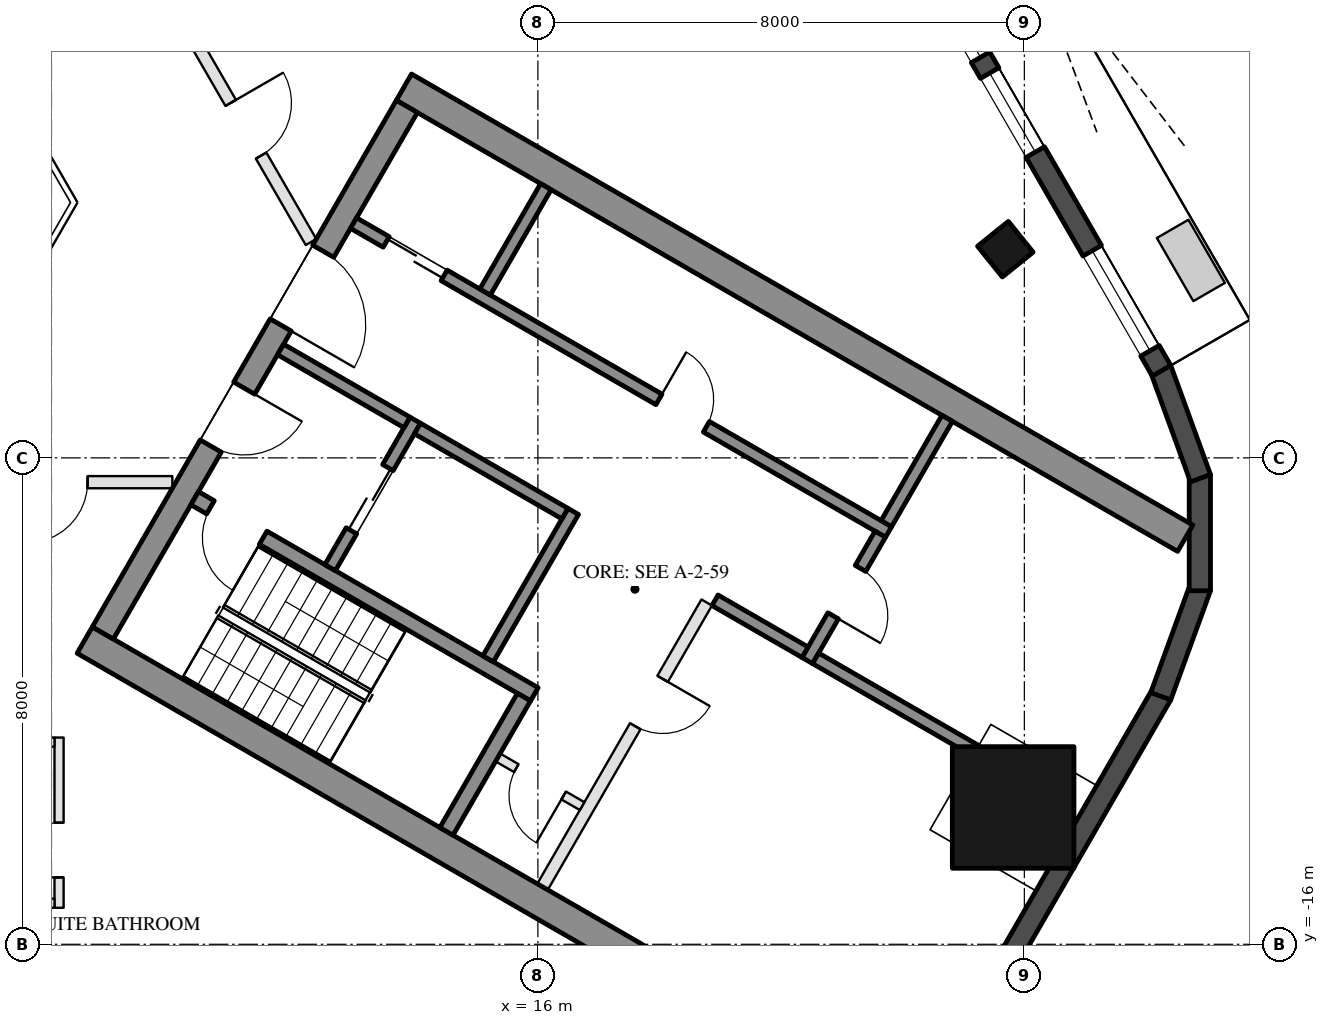
"""IFC4 building model, lengths in metres.
Left out: names, types, materials, properties, quantities, classifications, styles, units other than length and angle.
Written with IfcOpenShell. Run it as: python <this file> out.ifc"""

import sys

from ifc_helpers import new_model, si_unit, direction, frame, frame_2d, origin, origin_2d, place, context, subcontext, project, spatial, rectangle, hollow_rectangle, extrude, boolean, halfspace, element, fill, save


model = new_model("IFC4")
c1 = context("Model", 3, precision=1e-05, world=origin(), true_north=direction((0.0, 1.0)))
c2 = subcontext(c1, "Body", "Model", "MODEL_VIEW")
j1 = project(units=[si_unit("LENGTHUNIT", "METRE"), si_unit("PLANEANGLEUNIT", "RADIAN")], contexts=[c1])
p1 = place(None, origin())
s1 = spatial("IfcSite", under=j1, at=p1, CompositionType="ELEMENT")
p2 = place(p1, origin())
s2 = spatial("IfcBuilding", under=s1, at=p2, CompositionType="ELEMENT")
p3 = place(p2, frame((0.0, 0.0, 254.1)))
s3 = spatial("IfcBuildingStorey", under=s2, at=p3, CompositionType="ELEMENT", Elevation=254.1)
p4 = place(p3, frame((23.688, -4.568, 0.0), z_axis=(-0.190735837279, 0.02958801006, 0.981195388309), x_axis=(0.488489055842, -0.864137452388, 0.121016138189)))
e1 = element("IfcColumn", 1, at=p4, inside=s3, PredefinedType="COLUMN", context=c2, shape_type="SweptSolid", body=[
    boolean("DIFFERENCE", boolean("DIFFERENCE", extrude(hollow_rectangle(XDim=0.65, YDim=0.65, WallThickness=0.03, at=origin_2d()), origin(), (0.0, 0.0, 1.0), 3.771), halfspace(frame((0.0, 0.0, 0.047), z_axis=(0.0, 0.0, 1.0), x_axis=(1.0, 0.0, 0.0)), True)), halfspace(frame((0.0, 0.0, 3.724), z_axis=(0.0, 0.0, 1.0), x_axis=(1.0, 0.0, 0.0)), False)),
])
p5 = place(p3, frame((23.816, -13.75, 0.0), z_axis=(-0.188199890685, 0.108656131275, 0.976101760209), x_axis=(-0.499981359081, -0.866036165848, 3.792844e-06)))
e2 = element("IfcColumn", 2, at=p5, inside=s3, PredefinedType="COLUMN", context=c2, shape_type="SweptSolid", body=[
    boolean("DIFFERENCE", boolean("DIFFERENCE", extrude(hollow_rectangle(XDim=2.0, YDim=2.0, WallThickness=0.05, at=origin_2d()), origin(), (0.0, 0.0, 1.0), 3.791), halfspace(frame((0.0, 0.0, 0.112), z_axis=(0.0, 0.0, 1.0), x_axis=(1.0, 0.0, 0.0)), True)), halfspace(frame((0.0, 0.0, 3.678), z_axis=(0.0, 0.0, 1.0), x_axis=(1.0, 0.0, 0.0)), False)),
])
p6 = place(p3, frame((23.427, -16.792, 0.0), z_axis=(0.0, 0.0, 1.0), x_axis=(0.500018773155, 0.866014564827, 0.0)))
e3 = element("IfcWall", 3, at=p6, inside=s3, PredefinedType="SOLIDWALL", context=c2, shape_type="SweptSolid", body=[
    extrude(rectangle(XDim=5.658, YDim=0.35, at=frame_2d((2.829, 0.0))), origin(), (0.0, 0.0, 1.0), 3.55),
])
for number, where, z_axis, x_axis in (
    (4, (26.244, -11.92, 0.0), (0.0, 0.0, 1.0), (0.342, 0.94, 0.0)),
    (5, (26.886, -10.185, 0.0), (0.0, 0.0, 1.0), (0.0, 1.0, 0.0)),
    (6, (26.897, -8.335, 0.0), (0.0, 0.0, 1.0), (-0.342, 0.94, 0.0)),
):
    element("IfcWall", number, at=place(p3, frame(where, z_axis=z_axis, x_axis=x_axis)), inside=s3, PredefinedType="SOLIDWALL", context=c2, shape_type="SweptSolid", body=[
        extrude(rectangle(XDim=1.91, YDim=0.35, at=frame_2d((0.955, 0.0))), origin(), (0.0, 0.0, 1.0), 3.55),
    ])
p7 = place(p3, frame((26.257, -6.567, 0.0), z_axis=(0.0, 0.0, 1.0), x_axis=(-0.500023526245, 0.866011820475, 0.0)))
e7 = element("IfcWall", 7, at=p7, inside=s3, PredefinedType="SOLIDWALL", context=c2, shape_type="SweptSolid", body=[
    extrude(rectangle(XDim=11.816, YDim=0.35, at=frame_2d((5.908, 0.0))), origin(), (0.0, 0.0, 1.0), 3.55),
])
p8 = place(p7, frame((0.38, 0.0, 0.3)))
e8 = element("IfcOpeningElement", 8, at=p8, cuts=e7, PredefinedType="OPENING", context=c2, shape_type="SweptSolid", body=[
    extrude(rectangle(XDim=1.9, YDim=2.65, at=frame_2d((0.95, 1.325))), frame((0.0, 0.185, 0.0), z_axis=(0.0, -1.0, 0.0), x_axis=(1.0, 0.0, 0.0)), (0.0, 0.0, 1.0), 0.37),
])
p9 = place(p7, frame((7.836, 0.0, 0.0)))
e9 = element("IfcOpeningElement", 9, at=p9, cuts=e7, PredefinedType="OPENING", context=c2, shape_type="SweptSolid", body=[
    extrude(rectangle(XDim=2.4, YDim=2.4, at=frame_2d((1.2, 1.2))), frame((0.0, 0.185, 0.0), z_axis=(0.0, -1.0, 0.0), x_axis=(1.0, 0.0, 0.0)), (0.0, 0.0, 1.0), 0.37),
])
p10 = place(p7, frame((4.153, 0.0, 0.3)))
e10 = element("IfcOpeningElement", 10, at=p10, cuts=e7, PredefinedType="OPENING", context=c2, shape_type="SweptSolid", body=[
    extrude(rectangle(XDim=1.5, YDim=2.65, at=frame_2d((0.75, 1.325))), frame((0.0, 0.185, 0.0), z_axis=(0.0, -1.0, 0.0), x_axis=(1.0, 0.0, 0.0)), (0.0, 0.0, 1.0), 0.37),
])
p11 = place(p7, frame((5.953, 0.0, 0.3)))
e11 = element("IfcOpeningElement", 11, at=p11, cuts=e7, PredefinedType="OPENING", context=c2, shape_type="SweptSolid", body=[
    extrude(rectangle(XDim=1.5, YDim=2.65, at=frame_2d((0.75, 1.325))), frame((0.0, 0.185, 0.0), z_axis=(0.0, -1.0, 0.0), x_axis=(1.0, 0.0, 0.0)), (0.0, 0.0, 1.0), 0.37),
])
for number, where, z_axis, x_axis in (
    (12, (8.547, -10.997, 0.0), (0.0, 0.0, 1.0), (0.866, -0.5, 0.0)),
    (13, (13.797, -1.903, 0.0), (0.0, 0.0, 1.0), (0.866, -0.5, 0.0)),
):
    element("IfcWall", number, at=place(p3, frame(where, z_axis=z_axis, x_axis=x_axis)), inside=s3, PredefinedType="SHEAR", context=c2, shape_type="SweptSolid", body=[
        extrude(rectangle(XDim=14.837, YDim=0.5, at=frame_2d((7.418, 0.0))), origin(), (0.0, 0.0, 1.0), 3.5),
    ])
p12 = place(p3, frame((8.845, -10.88, 0.0), z_axis=(0.0, 0.0, 1.0), x_axis=(0.500004234368, 0.866022959057, 0.0)))
e14 = element("IfcWall", 14, at=p12, inside=s3, PredefinedType="SHEAR", context=c2, shape_type="SweptSolid", body=[
    extrude(rectangle(XDim=10.0, YDim=0.4, at=frame_2d((5.0, 0.0))), origin(), (0.0, 0.0, 1.0), 3.5),
])
p13 = place(p12, frame((3.55, 0.0, 0.0)))
e15 = element("IfcOpeningElement", 15, at=p13, cuts=e14, PredefinedType="OPENING", context=c2, shape_type="SweptSolid", body=[
    extrude(rectangle(XDim=1.1, YDim=2.1, at=frame_2d((0.55, 1.05))), frame((0.0, 0.21, 0.0), z_axis=(0.0, -1.0, 0.0), x_axis=(1.0, 0.0, 0.0)), (0.0, 0.0, 1.0), 0.42),
])
p14 = place(p12, frame((5.85, 0.0, 0.0)))
e16 = element("IfcOpeningElement", 16, at=p14, cuts=e14, PredefinedType="OPENING", context=c2, shape_type="SweptSolid", body=[
    extrude(rectangle(XDim=1.4, YDim=2.1, at=frame_2d((0.7, 1.05))), frame((0.0, 0.21, 0.0), z_axis=(0.0, -1.0, 0.0), x_axis=(1.0, 0.0, 0.0)), (0.0, 0.0, 1.0), 0.42),
])
p15 = place(p3, frame((10.356, -8.664, 0.0), z_axis=(0.0, 0.0, 1.0), x_axis=(0.866028629588, -0.499994412703, 0.0)))
e17 = element("IfcWall", 17, at=p15, inside=s3, PredefinedType="SHEAR", context=c2, shape_type="SweptSolid", body=[
    extrude(rectangle(XDim=6.45, YDim=0.25, at=frame_2d((3.225, 0.0))), origin(), (0.0, 0.0, 1.0), 3.5),
])
p16 = place(p15, frame((0.3, 0.0, 0.0)))
e18 = element("IfcOpeningElement", 18, at=p16, cuts=e17, PredefinedType="OPENING", context=c2, shape_type="SweptSolid", body=[
    extrude(rectangle(XDim=1.0, YDim=2.1, at=frame_2d((0.5, 1.05))), frame((0.0, 0.135, 0.0), z_axis=(0.0, -1.0, 0.0), x_axis=(1.0, 0.0, 0.0)), (0.0, 0.0, 1.0), 0.27),
])
p17 = place(p3, frame((14.496, -14.143, 0.0), z_axis=(0.0, 0.0, 1.0), x_axis=(0.500062241894, 0.865989465428, 0.0)))
e19 = element("IfcWall", 19, at=p17, inside=s3, PredefinedType="SHEAR", context=c2, shape_type="SweptSolid", body=[
    extrude(rectangle(XDim=2.55, YDim=0.25, at=frame_2d((1.275, 0.0))), origin(), (0.0, 0.0, 1.0), 3.5),
])
p18 = place(p3, frame((15.181, -11.305, 0.0), z_axis=(0.0, 0.0, 1.0), x_axis=(0.49994636267, 0.866056369097, 0.0)))
e20 = element("IfcWall", 20, at=p18, inside=s3, PredefinedType="SHEAR", context=c2, shape_type="SweptSolid", body=[
    extrude(rectangle(XDim=2.8, YDim=0.2, at=frame_2d((1.4, 0.0))), origin(), (0.0, 0.0, 1.0), 3.5),
])
p19 = place(p3, frame((12.583, -9.805, 0.0), z_axis=(0.0, 0.0, 1.0), x_axis=(0.49994636267, 0.866056369097, 0.0)))
e21 = element("IfcWall", 21, at=p19, inside=s3, PredefinedType="SHEAR", context=c2, shape_type="SweptSolid", body=[
    extrude(rectangle(XDim=2.8, YDim=0.2, at=frame_2d((1.4, 0.0))), origin(), (0.0, 0.0, 1.0), 3.5),
])
p20 = place(p19, frame((0.7, 0.0, 0.0)))
e22 = element("IfcOpeningElement", 22, at=p20, cuts=e21, PredefinedType="OPENING", context=c2, shape_type="SweptSolid", body=[
    extrude(rectangle(XDim=1.2, YDim=2.1, at=frame_2d((0.6, 1.05))), frame((0.0, 0.11, 0.0), z_axis=(0.0, -1.0, 0.0), x_axis=(1.0, 0.0, 0.0)), (0.0, 0.0, 1.0), 0.22),
])
p21 = place(p3, frame((11.768, -6.217, 0.0), z_axis=(0.0, 0.0, 1.0), x_axis=(0.866050077142, -0.499957262057, 0.0)))
e23 = element("IfcWall", 23, at=p21, inside=s3, PredefinedType="SHEAR", context=c2, shape_type="SweptSolid", body=[
    extrude(rectangle(XDim=2.4, YDim=0.2, at=frame_2d((1.2, 0.0))), origin(), (0.0, 0.0, 1.0), 3.5),
])
p22 = place(p3, frame((14.02, -7.517, 0.0), z_axis=(0.0, 0.0, 1.0), x_axis=(0.866034573852, -0.49998411664, 0.0)))
e24 = element("IfcWall", 24, at=p22, inside=s3, PredefinedType="SHEAR", context=c2, shape_type="SweptSolid", body=[
    extrude(rectangle(XDim=2.8, YDim=0.2, at=frame_2d((1.4, 0.0))), origin(), (0.0, 0.0, 1.0), 3.5),
])
p23 = place(p3, frame((12.968, -4.138, 0.0), z_axis=(0.0, 0.0, 1.0), x_axis=(0.866028328073, -0.49999493495, 0.0)))
e25 = element("IfcWall", 25, at=p23, inside=s3, PredefinedType="SHEAR", context=c2, shape_type="SweptSolid", body=[
    extrude(rectangle(XDim=10.16, YDim=0.2, at=frame_2d((5.08, 0.0))), origin(), (0.0, 0.0, 1.0), 3.5),
])
p24 = place(p23, frame((0.62, 0.0, 0.0)))
e26 = element("IfcOpeningElement", 26, at=p24, cuts=e25, PredefinedType="OPENING", context=c2, shape_type="SweptSolid", body=[
    extrude(rectangle(XDim=1.1, YDim=2.1, at=frame_2d((0.55, 1.05))), frame((0.0, 0.11, 0.0), z_axis=(0.0, -1.0, 0.0), x_axis=(1.0, 0.0, 0.0)), (0.0, 0.0, 1.0), 0.22),
])
p25 = place(p23, frame((5.8, 0.0, 0.0)))
e27 = element("IfcOpeningElement", 27, at=p25, cuts=e25, PredefinedType="OPENING", context=c2, shape_type="SweptSolid", body=[
    extrude(rectangle(XDim=0.9, YDim=2.1, at=frame_2d((0.45, 1.05))), frame((0.0, 0.11, 0.0), z_axis=(0.0, -1.0, 0.0), x_axis=(1.0, 0.0, 0.0)), (0.0, 0.0, 1.0), 0.22),
])
p26 = place(p3, frame((20.43, -11.333, 0.0), z_axis=(0.0, 0.0, 1.0), x_axis=(0.500001309137, 0.866024647952, 0.0)))
e28 = element("IfcWall", 28, at=p26, inside=s3, PredefinedType="SHEAR", context=c2, shape_type="SweptSolid", body=[
    extrude(rectangle(XDim=2.4, YDim=0.2, at=frame_2d((1.2, 0.0))), origin(), (0.0, 0.0, 1.0), 3.5),
])
p27 = place(p26, frame((0.85, 0.0, 0.0)))
e29 = element("IfcOpeningElement", 29, at=p27, cuts=e28, PredefinedType="OPENING", context=c2, shape_type="SweptSolid", body=[
    extrude(rectangle(XDim=0.9, YDim=2.1, at=frame_2d((0.45, 1.05))), frame((0.0, 0.11, 0.0), z_axis=(0.0, -1.0, 0.0), x_axis=(1.0, 0.0, 0.0)), (0.0, 0.0, 1.0), 0.22),
])
p28 = place(p3, frame((18.913, -10.342, 0.0), z_axis=(0.0, 0.0, 1.0), x_axis=(0.866038183914, -0.499977863513, 0.0)))
e30 = element("IfcWall", 30, at=p28, inside=s3, PredefinedType="SHEAR", context=c2, shape_type="SweptSolid", body=[
    extrude(rectangle(XDim=1.71, YDim=0.2, at=frame_2d((0.855, 0.0))), origin(), (0.0, 0.0, 1.0), 3.5),
])
for number, where, z_axis, x_axis in (
    (31, (15.131, -5.272, 0.0), (0.0, 0.0, 1.0), (0.5, 0.866, 0.0)),
    (32, (21.73, -9.082, 0.0), (0.0, 0.0, 1.0), (0.5, 0.866, 0.0)),
):
    element("IfcWall", number, at=place(p3, frame(where, z_axis=z_axis, x_axis=x_axis)), inside=s3, PredefinedType="SHEAR", context=c2, shape_type="SweptSolid", body=[
        extrude(rectangle(XDim=2.0, YDim=0.2, at=frame_2d((1.0, 0.0))), origin(), (0.0, 0.0, 1.0), 3.5),
    ])
p29 = place(p3, frame((20.567, -11.297, 0.0), z_axis=(0.0, 0.0, 1.0), x_axis=(0.866065229334, -0.49993101378, 0.0)))
e33 = element("IfcWall", 33, at=p29, inside=s3, PredefinedType="SHEAR", context=c2, shape_type="SweptSolid", body=[
    extrude(rectangle(XDim=3.04, YDim=0.2, at=frame_2d((1.52, 0.0))), origin(), (0.0, 0.0, 1.0), 3.5),
])
p30 = place(p3, frame((16.076, -15.055, 0.0), z_axis=(0.0, 0.0, 1.0), x_axis=(0.499995103361, 0.866028230842, 0.0)))
e34 = element("IfcWall", 34, at=p30, inside=s3, PredefinedType="PARTITIONING", context=c2, shape_type="SweptSolid", body=[
    extrude(rectangle(XDim=5.4, YDim=0.2, at=frame_2d((2.7, 0.0))), origin(), (0.0, 0.0, 1.0), 3.5),
])
p31 = place(p30, frame((3.05, 0.0, 0.0)))
e35 = element("IfcOpeningElement", 35, at=p31, cuts=e34, PredefinedType="OPENING", context=c2, shape_type="SweptSolid", body=[
    extrude(rectangle(XDim=0.9, YDim=2.1, at=frame_2d((0.45, 1.05))), frame((0.0, 0.11, 0.0), z_axis=(0.0, -1.0, 0.0), x_axis=(1.0, 0.0, 0.0)), (0.0, 0.0, 1.0), 0.22),
])
p32 = place(p3, frame((15.342, -12.928, 0.0), z_axis=(0.0, 0.0, 1.0), x_axis=(0.865989903783, -0.500061482766, 0.0)))
e36 = element("IfcWall", 36, at=p32, inside=s3, PredefinedType="PARTITIONING", context=c2, shape_type="SweptSolid", body=[
    extrude(rectangle(XDim=1.6, YDim=0.15, at=frame_2d((0.8, 0.0))), origin(), (0.0, 0.0, 1.0), 3.5),
])
p33 = place(p32, frame((0.35, 0.0, 0.0)))
e37 = element("IfcOpeningElement", 37, at=p33, cuts=e36, PredefinedType="OPENING", context=c2, shape_type="SweptSolid", body=[
    extrude(rectangle(XDim=0.9, YDim=2.1, at=frame_2d((0.45, 1.05))), frame((0.0, 0.085, 0.0), z_axis=(0.0, -1.0, 0.0), x_axis=(1.0, 0.0, 0.0)), (0.0, 0.0, 1.0), 0.17),
])
p34 = place(p3, frame((9.988, -8.4, 0.0), z_axis=(0.0, 0.0, 1.0), x_axis=(-1.0, 0.0, 0.0)))
e38 = element("IfcWall", 38, at=p34, inside=s3, PredefinedType="PARTITIONING", context=c2, shape_type="SweptSolid", body=[
    extrude(rectangle(XDim=3.788, YDim=0.2, at=frame_2d((1.894, 0.0))), origin(), (0.0, 0.0, 1.0), 3.0),
])
p35 = place(p34, frame((1.394, 0.0, 0.0)))
e39 = element("IfcOpeningElement", 39, at=p35, cuts=e38, PredefinedType="OPENING", context=c2, shape_type="SweptSolid", body=[
    extrude(rectangle(XDim=1.0, YDim=2.1, at=frame_2d((0.5, 1.05))), frame((0.0, 0.11, 0.0), z_axis=(0.0, -1.0, 0.0), x_axis=(1.0, 0.0, 0.0)), (0.0, 0.0, 1.0), 0.22),
])
p36 = place(p3, frame((8.125, -15.4, 0.0), z_axis=(0.0, 0.0, 1.0), x_axis=(0.0, 1.0, 0.0)))
e40 = element("IfcWall", 40, at=p36, inside=s3, PredefinedType="PARTITIONING", context=c2, shape_type="SweptSolid", body=[
    extrude(rectangle(XDim=2.8, YDim=0.15, at=frame_2d((1.4, 0.0))), origin(), (0.0, 0.0, 1.0), 3.55),
])
p37 = place(p36, frame((0.5, 0.0, 0.0)))
e41 = element("IfcOpeningElement", 41, at=p37, cuts=e40, PredefinedType="OPENING", context=c2, shape_type="SweptSolid", body=[
    extrude(rectangle(XDim=0.9, YDim=2.1, at=frame_2d((0.45, 1.05))), frame((0.0, 0.085, 0.0), z_axis=(0.0, -1.0, 0.0), x_axis=(1.0, 0.0, 0.0)), (0.0, 0.0, 1.0), 0.17),
])
for number, where, z_axis, x_axis in (
    (42, (6.2, -15.325, 0.0), (0.0, 0.0, 1.0), (1.0, 0.0, 0.0)),
    (43, (6.2, -12.675, 0.0), (0.0, 0.0, 1.0), (1.0, 0.0, 0.0)),
):
    element("IfcWall", number, at=place(p3, frame(where, z_axis=z_axis, x_axis=x_axis)), inside=s3, PredefinedType="PARTITIONING", context=c2, shape_type="SweptSolid", body=[
        extrude(rectangle(XDim=1.85, YDim=0.15, at=frame_2d((0.925, 0.0))), origin(), (0.0, 0.0, 1.0), 3.0),
    ])
p38 = place(p3, frame((10.127, -0.741, 0.0), z_axis=(0.0, 0.0, 1.0), x_axis=(0.500038251005, -0.86600331843, 0.0)))
e44 = element("IfcWall", 44, at=p38, inside=s3, PredefinedType="PARTITIONING", context=c2, shape_type="SweptSolid", body=[
    extrude(rectangle(XDim=4.283, YDim=0.2, at=frame_2d((2.142, 0.0))), origin(), (0.0, 0.0, 1.0), 3.0),
])
p39 = place(p38, frame((1.641, 0.0, 0.0)))
e45 = element("IfcOpeningElement", 45, at=p39, cuts=e44, PredefinedType="OPENING", context=c2, shape_type="SweptSolid", body=[
    extrude(rectangle(XDim=1.0, YDim=2.1, at=frame_2d((0.5, 1.05))), frame((0.0, 0.11, 0.0), z_axis=(0.0, -1.0, 0.0), x_axis=(1.0, 0.0, 0.0)), (0.0, 0.0, 1.0), 0.22),
])
p40 = place(p8, origin())
e46 = element("IfcWindow", 46, at=p40, inside=s3, PartitioningType="SINGLE_PANEL", PredefinedType="WINDOW", context=c2, shape_type="SweptSolid", body=[
    extrude(rectangle(XDim=1.9, YDim=2.65, at=frame_2d((0.95, 1.325))), frame((0.0, 0.03, 0.0), z_axis=(0.0, -1.0, 0.0), x_axis=(1.0, 0.0, 0.0)), (0.0, 0.0, 1.0), 0.06),
])
fill(e8, e46)
p41 = place(p10, origin())
e47 = element("IfcWindow", 47, at=p41, inside=s3, PartitioningType="SINGLE_PANEL", PredefinedType="WINDOW", context=c2, shape_type="SweptSolid", body=[
    extrude(rectangle(XDim=1.5, YDim=2.65, at=frame_2d((0.75, 1.325))), frame((0.0, 0.03, 0.0), z_axis=(0.0, -1.0, 0.0), x_axis=(1.0, 0.0, 0.0)), (0.0, 0.0, 1.0), 0.06),
])
fill(e10, e47)
p42 = place(p11, origin())
e48 = element("IfcWindow", 48, at=p42, inside=s3, PartitioningType="SINGLE_PANEL", PredefinedType="WINDOW", context=c2, shape_type="SweptSolid", body=[
    extrude(rectangle(XDim=1.5, YDim=2.65, at=frame_2d((0.75, 1.325))), frame((0.0, 0.03, 0.0), z_axis=(0.0, -1.0, 0.0), x_axis=(1.0, 0.0, 0.0)), (0.0, 0.0, 1.0), 0.06),
])
fill(e11, e48)
p43 = place(p20, origin())
e49 = element("IfcDoor", 49, at=p43, inside=s3, OperationType="DOUBLE_DOOR_SLIDING", PredefinedType="DOOR", context=c2, shape_type="SweptSolid", body=[
    extrude(rectangle(XDim=1.2, YDim=2.1, at=frame_2d((0.6, 1.05))), frame((0.0, 0.025, 0.0), z_axis=(0.0, -1.0, 0.0), x_axis=(1.0, 0.0, 0.0)), (0.0, 0.0, 1.0), 0.05),
])
fill(e22, e49)
p44 = place(p33, frame((0.9, 0.0, 0.0), z_axis=(0.0, 0.0, 1.0), x_axis=(-1.0, 0.0, 0.0)))
e50 = element("IfcDoor", 50, at=p44, inside=s3, OperationType="SINGLE_SWING_LEFT", PredefinedType="DOOR", context=c2, shape_type="SweptSolid", body=[
    extrude(rectangle(XDim=0.9, YDim=2.1, at=frame_2d((0.45, 1.05))), frame((0.0, 0.025, 0.0), z_axis=(0.0, -1.0, 0.0), x_axis=(1.0, 0.0, 0.0)), (0.0, 0.0, 1.0), 0.05),
])
fill(e37, e50)
p45 = place(p24, origin())
e51 = element("IfcDoor", 51, at=p45, inside=s3, OperationType="DOUBLE_DOOR_SLIDING", PredefinedType="DOOR", context=c2, shape_type="SweptSolid", body=[
    extrude(rectangle(XDim=1.1, YDim=2.1, at=frame_2d((0.55, 1.05))), frame((0.0, 0.025, 0.0), z_axis=(0.0, -1.0, 0.0), x_axis=(1.0, 0.0, 0.0)), (0.0, 0.0, 1.0), 0.05),
])
fill(e26, e51)
p46 = place(p25, origin())
e52 = element("IfcDoor", 52, at=p46, inside=s3, OperationType="SINGLE_SWING_LEFT", PredefinedType="DOOR", context=c2, shape_type="SweptSolid", body=[
    extrude(rectangle(XDim=0.9, YDim=2.1, at=frame_2d((0.45, 1.05))), frame((0.0, 0.025, 0.0), z_axis=(0.0, -1.0, 0.0), x_axis=(1.0, 0.0, 0.0)), (0.0, 0.0, 1.0), 0.05),
])
fill(e27, e52)
p47 = place(p27, frame((0.9, 0.0, 0.0), z_axis=(0.0, 0.0, 1.0), x_axis=(-1.0, 0.0, 0.0)))
e53 = element("IfcDoor", 53, at=p47, inside=s3, OperationType="SINGLE_SWING_RIGHT", PredefinedType="DOOR", context=c2, shape_type="SweptSolid", body=[
    extrude(rectangle(XDim=0.9, YDim=2.1, at=frame_2d((0.45, 1.05))), frame((0.0, 0.025, 0.0), z_axis=(0.0, -1.0, 0.0), x_axis=(1.0, 0.0, 0.0)), (0.0, 0.0, 1.0), 0.05),
])
fill(e29, e53)
p48 = place(p31, frame((0.9, 0.0, 0.0), z_axis=(0.0, 0.0, 1.0), x_axis=(-1.0, 0.0, 0.0)))
e54 = element("IfcDoor", 54, at=p48, inside=s3, OperationType="SINGLE_SWING_LEFT", PredefinedType="DOOR", context=c2, shape_type="SweptSolid", body=[
    extrude(rectangle(XDim=0.9, YDim=2.1, at=frame_2d((0.45, 1.05))), frame((0.0, 0.025, 0.0), z_axis=(0.0, -1.0, 0.0), x_axis=(1.0, 0.0, 0.0)), (0.0, 0.0, 1.0), 0.05),
])
fill(e35, e54)
p49 = place(p13, frame((1.1, 0.0, 0.0), z_axis=(0.0, 0.0, 1.0), x_axis=(-1.0, 0.0, 0.0)))
e55 = element("IfcDoor", 55, at=p49, inside=s3, OperationType="SINGLE_SWING_LEFT", PredefinedType="DOOR", context=c2, shape_type="SweptSolid", body=[
    extrude(rectangle(XDim=1.1, YDim=2.1, at=frame_2d((0.55, 1.05))), frame((0.0, 0.025, 0.0), z_axis=(0.0, -1.0, 0.0), x_axis=(1.0, 0.0, 0.0)), (0.0, 0.0, 1.0), 0.05),
])
fill(e15, e55)
p50 = place(p14, frame((1.4, 0.0, 0.0), z_axis=(0.0, 0.0, 1.0), x_axis=(-1.0, 0.0, 0.0)))
e56 = element("IfcDoor", 56, at=p50, inside=s3, OperationType="DOUBLE_DOOR_SINGLE_SWING", PredefinedType="DOOR", context=c2, shape_type="SweptSolid", body=[
    extrude(rectangle(XDim=1.4, YDim=2.1, at=frame_2d((0.7, 1.05))), frame((0.0, 0.025, 0.0), z_axis=(0.0, -1.0, 0.0), x_axis=(1.0, 0.0, 0.0)), (0.0, 0.0, 1.0), 0.05),
])
fill(e16, e56)
p51 = place(p16, frame((1.0, 0.0, 0.0), z_axis=(0.0, 0.0, 1.0), x_axis=(-1.0, 0.0, 0.0)))
e57 = element("IfcDoor", 57, at=p51, inside=s3, OperationType="SINGLE_SWING_LEFT", PredefinedType="DOOR", context=c2, shape_type="SweptSolid", body=[
    extrude(rectangle(XDim=1.0, YDim=2.1, at=frame_2d((0.5, 1.05))), frame((0.0, 0.025, 0.0), z_axis=(0.0, -1.0, 0.0), x_axis=(1.0, 0.0, 0.0)), (0.0, 0.0, 1.0), 0.05),
])
fill(e18, e57)
p52 = place(p37, origin())
e58 = element("IfcDoor", 58, at=p52, inside=s3, OperationType="SINGLE_SWING_LEFT", PredefinedType="DOOR", context=c2, shape_type="SweptSolid", body=[
    extrude(rectangle(XDim=0.9, YDim=2.1, at=frame_2d((0.45, 1.05))), frame((0.0, 0.025, 0.0), z_axis=(0.0, -1.0, 0.0), x_axis=(1.0, 0.0, 0.0)), (0.0, 0.0, 1.0), 0.05),
])
fill(e41, e58)
p53 = place(p35, origin())
e59 = element("IfcDoor", 59, at=p53, inside=s3, OperationType="SINGLE_SWING_RIGHT", PredefinedType="DOOR", context=c2, shape_type="SweptSolid", body=[
    extrude(rectangle(XDim=1.0, YDim=2.1, at=frame_2d((0.5, 1.05))), frame((0.0, 0.025, 0.0), z_axis=(0.0, -1.0, 0.0), x_axis=(1.0, 0.0, 0.0)), (0.0, 0.0, 1.0), 0.05),
])
fill(e39, e59)
p54 = place(p39, origin())
e60 = element("IfcDoor", 60, at=p54, inside=s3, OperationType="SINGLE_SWING_LEFT", PredefinedType="DOOR", context=c2, shape_type="SweptSolid", body=[
    extrude(rectangle(XDim=1.0, YDim=2.1, at=frame_2d((0.5, 1.05))), frame((0.0, 0.025, 0.0), z_axis=(0.0, -1.0, 0.0), x_axis=(1.0, 0.0, 0.0)), (0.0, 0.0, 1.0), 0.05),
])
fill(e45, e60)
save(model, sys.argv[1])
